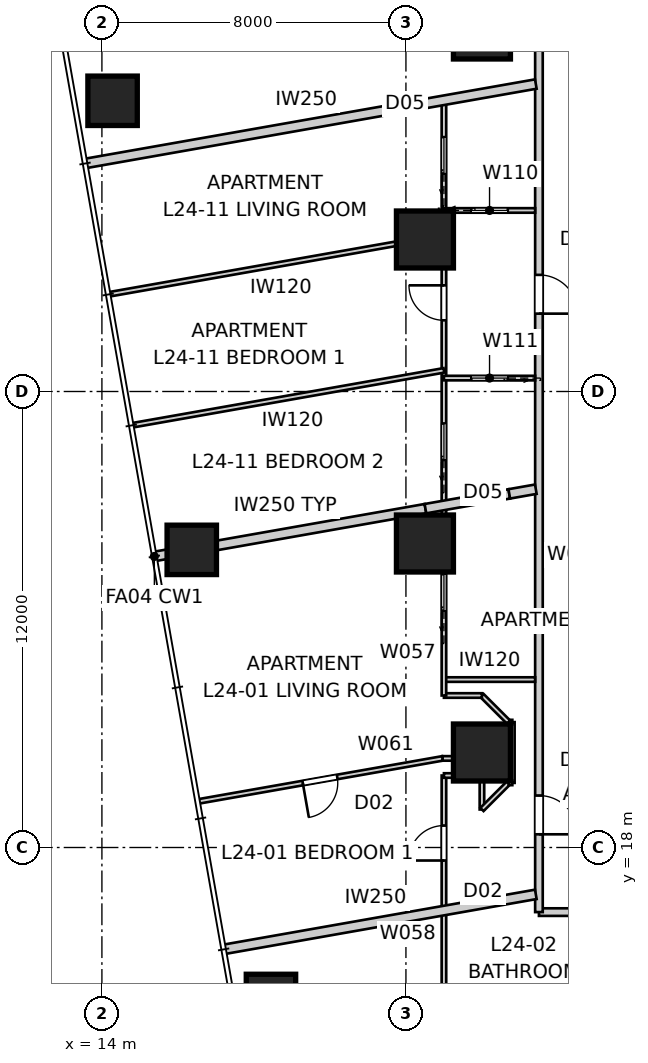
"""IFC4 building model, lengths in metres.
Left out: names, types, materials, properties, quantities, classifications, styles, units other than length and angle.
Written with IfcOpenShell. Run it as: python <this file> out.ifc"""

import sys

from ifc_helpers import new_model, si_unit, direction, frame, frame_2d, origin, origin_2d, place, context, subcontext, project, spatial, rectangle, extrude, element, fill, save


model = new_model("IFC4")
c1 = context("Model", 3, precision=1e-05, world=origin(), true_north=direction((0.0, 1.0)))
c2 = subcontext(c1, "Body", "Model", "MODEL_VIEW")
j1 = project(units=[si_unit("LENGTHUNIT", "METRE"), si_unit("PLANEANGLEUNIT", "RADIAN")], contexts=[c1])
p1 = place(None, origin())
s1 = spatial("IfcSite", under=j1, at=p1, CompositionType="ELEMENT")
p2 = place(p1, origin())
s2 = spatial("IfcBuilding", under=s1, at=p2, CompositionType="ELEMENT")
p3 = place(p2, frame((0.0, 0.0, 89.6)))
s3 = spatial("IfcBuildingStorey", under=s2, at=p3, CompositionType="ELEMENT", Elevation=89.6)
for number, where, z_axis, x_axis in (
    (1, (14.281, 37.65, 0.0), (0.0, 0.0, 1.0), (1.0, 0.0, 0.0)),
    (2, (16.365, 25.833, 0.0), (0.0, 0.0, 1.0), (1.0, 0.0, 0.0)),
    (3, (18.448, 14.015, 0.0), (0.0, 0.0, 1.0), (1.0, 0.0, 0.0)),
):
    element("IfcColumn", number, at=place(p3, frame(where, z_axis=z_axis, x_axis=x_axis)), inside=s3, PredefinedType="COLUMN", context=c2, shape_type="SweptSolid", body=[
        extrude(rectangle(XDim=1.3, YDim=1.3, at=origin_2d()), origin(), (0.0, 0.0, 1.0), 3.4),
    ])
for number, where, z_axis, x_axis in (
    (4, (24.0, 39.5, 0.0), (0.0, 0.0, 1.0), (1.0, 0.0, 0.0)),
    (5, (22.5, 34.0, 0.0), (0.0, 0.0, 1.0), (1.0, 0.0, 0.0)),
    (6, (22.5, 26.0, 0.0), (0.0, 0.0, 1.0), (1.0, 0.0, 0.0)),
    (7, (24.0, 20.5, 0.0), (0.0, 0.0, 1.0), (1.0, 0.0, 0.0)),
):
    element("IfcColumn", number, at=place(p3, frame(where, z_axis=z_axis, x_axis=x_axis)), inside=s3, PredefinedType="COLUMN", context=c2, shape_type="SweptSolid", body=[
        extrude(rectangle(XDim=1.5, YDim=1.5, at=origin_2d()), origin(), (0.0, 0.0, 1.0), 3.4),
    ])
p4 = place(p3, frame((25.5, 16.3, 0.0), z_axis=(0.0, 0.0, 1.0), x_axis=(1.0, 0.0, 0.0)))
e8 = element("IfcWall", 8, at=p4, inside=s3, PredefinedType="PARTITIONING", context=c2, shape_type="SweptSolid", body=[
    extrude(rectangle(XDim=29.0, YDim=0.2, at=frame_2d((14.5, 0.0))), origin(), (0.0, 0.0, 1.0), 3.25),
])
p5 = place(p4, frame((20.896, 0.0, 0.0)))
e9 = element("IfcOpeningElement", 9, at=p5, cuts=e8, PredefinedType="OPENING", context=c2, shape_type="SweptSolid", body=[
    extrude(rectangle(XDim=1.02, YDim=2.34, at=frame_2d((0.51, 1.17))), frame((0.0, 0.11, 0.0), z_axis=(0.0, -1.0, 0.0), x_axis=(1.0, 0.0, 0.0)), (0.0, 0.0, 1.0), 0.22),
])
p6 = place(p4, frame((14.257, 0.0, 0.0)))
e10 = element("IfcOpeningElement", 10, at=p6, cuts=e8, PredefinedType="OPENING", context=c2, shape_type="SweptSolid", body=[
    extrude(rectangle(XDim=1.02, YDim=2.34, at=frame_2d((0.51, 1.17))), frame((0.0, 0.11, 0.0), z_axis=(0.0, -1.0, 0.0), x_axis=(1.0, 0.0, 0.0)), (0.0, 0.0, 1.0), 0.22),
])
p7 = place(p4, frame((3.857, 0.0, 0.0)))
e11 = element("IfcOpeningElement", 11, at=p7, cuts=e8, PredefinedType="OPENING", context=c2, shape_type="SweptSolid", body=[
    extrude(rectangle(XDim=1.02, YDim=2.34, at=frame_2d((0.51, 1.17))), frame((0.0, 0.11, 0.0), z_axis=(0.0, -1.0, 0.0), x_axis=(1.0, 0.0, 0.0)), (0.0, 0.0, 1.0), 0.22),
])
p8 = place(p3, frame((25.5, 43.7, 0.0), z_axis=(0.0, 0.0, 1.0), x_axis=(0.0, -1.0, 0.0)))
e12 = element("IfcWall", 12, at=p8, inside=s3, PredefinedType="PARTITIONING", context=c2, shape_type="SweptSolid", body=[
    extrude(rectangle(XDim=27.4, YDim=0.2, at=frame_2d((13.7, 0.0))), origin(), (0.0, 0.0, 1.0), 3.25),
])
p9 = place(p8, frame((24.333, 0.0, 0.0)))
e13 = element("IfcOpeningElement", 13, at=p9, cuts=e12, PredefinedType="OPENING", context=c2, shape_type="SweptSolid", body=[
    extrude(rectangle(XDim=1.02, YDim=2.1, at=frame_2d((0.51, 1.05))), frame((0.0, 0.11, 0.0), z_axis=(0.0, -1.0, 0.0), x_axis=(1.0, 0.0, 0.0)), (0.0, 0.0, 1.0), 0.22),
])
p10 = place(p8, frame((10.631, 0.0, 0.0)))
e14 = element("IfcOpeningElement", 14, at=p10, cuts=e12, PredefinedType="OPENING", context=c2, shape_type="SweptSolid", body=[
    extrude(rectangle(XDim=1.02, YDim=2.34, at=frame_2d((0.51, 1.17))), frame((0.0, 0.11, 0.0), z_axis=(0.0, -1.0, 0.0), x_axis=(1.0, 0.0, 0.0)), (0.0, 0.0, 1.0), 0.22),
])
p11 = place(p8, frame((0.911, 0.0, 0.0)))
e15 = element("IfcOpeningElement", 15, at=p11, cuts=e12, PredefinedType="OPENING", context=c2, shape_type="SweptSolid", body=[
    extrude(rectangle(XDim=1.02, YDim=2.34, at=frame_2d((0.51, 1.17))), frame((0.0, 0.11, 0.0), z_axis=(0.0, -1.0, 0.0), x_axis=(1.0, 0.0, 0.0)), (0.0, 0.0, 1.0), 0.22),
])
p12 = place(p3, frame((15.38, 25.659, 0.0), z_axis=(0.0, 0.0, 1.0), x_axis=(0.984802553948, 0.173677660443, 0.0)))
e16 = element("IfcWall", 16, at=p12, inside=s3, PredefinedType="PARTITIONING", context=c2, shape_type="SweptSolid", body=[
    extrude(rectangle(XDim=7.244, YDim=0.25, at=frame_2d((3.622, 0.0))), origin(), (0.0, 0.0, 1.0), 3.25),
])
p13 = place(p3, frame((22.513, 26.917, 0.0), z_axis=(0.0, 0.0, 1.0), x_axis=(0.984809882944, 0.17363609779, 0.0)))
e17 = element("IfcWall", 17, at=p13, inside=s3, PredefinedType="PARTITIONING", context=c2, shape_type="SweptSolid", body=[
    extrude(rectangle(XDim=2.24, YDim=0.25, at=frame_2d((1.12, 0.0))), origin(), (0.0, 0.0, 1.0), 2.796),
])
p14 = place(p3, frame((24.719, 27.306, 0.0), z_axis=(0.0, 0.0, 1.0), x_axis=(0.984835495461, 0.173490768861, 0.0)))
e18 = element("IfcWall", 18, at=p14, inside=s3, PredefinedType="PARTITIONING", context=c2, shape_type="SweptSolid", body=[
    extrude(rectangle(XDim=0.709, YDim=0.25, at=frame_2d((0.354, 0.0))), origin(), (0.0, 0.0, 1.0), 3.25),
])
p15 = place(p3, frame((13.556, 35.999, 0.0), z_axis=(0.0, 0.0, 1.0), x_axis=(0.984806609184, 0.173654664517, 0.0)))
e19 = element("IfcWall", 19, at=p15, inside=s3, PredefinedType="PARTITIONING", context=c2, shape_type="SweptSolid", body=[
    extrude(rectangle(XDim=12.044, YDim=0.25, at=frame_2d((6.022, 0.0))), origin(), (0.0, 0.0, 1.0), 3.25),
])
p16 = place(p3, frame((17.203, 15.318, 0.0), z_axis=(0.0, 0.0, 1.0), x_axis=(0.984807121942, 0.173651756605, 0.0)))
e20 = element("IfcWall", 20, at=p16, inside=s3, PredefinedType="PARTITIONING", context=c2, shape_type="SweptSolid", body=[
    extrude(rectangle(XDim=8.341, YDim=0.25, at=frame_2d((4.171, 0.0))), origin(), (0.0, 0.0, 1.0), 3.25),
])
p17 = place(p3, frame((23.0, 22.419, 0.0), z_axis=(0.0, 0.0, 1.0), x_axis=(1.0, 0.0, 0.0)))
e21 = element("IfcWall", 21, at=p17, inside=s3, PredefinedType="PARTITIONING", context=c2, shape_type="SweptSolid", body=[
    extrude(rectangle(XDim=2.4, YDim=0.12, at=frame_2d((1.2, 0.0))), origin(), (0.0, 0.0, 1.0), 3.25),
])
p18 = place(p3, frame((24.0, 20.344, 0.0), z_axis=(0.0, 0.0, 1.0), x_axis=(0.0, -1.0, 0.0)))
e22 = element("IfcWall", 22, at=p18, inside=s3, PredefinedType="PARTITIONING", context=c2, shape_type="SweptSolid", body=[
    extrude(rectangle(XDim=1.344, YDim=0.12, at=frame_2d((0.672, 0.0))), origin(), (0.0, 0.0, 1.0), 3.25),
])
p19 = place(p3, frame((24.0, 19.0, 0.0), z_axis=(0.0, 0.0, 1.0), x_axis=(0.707106781187, 0.707106781187, 0.0)))
e23 = element("IfcWall", 23, at=p19, inside=s3, PredefinedType="PARTITIONING", context=c2, shape_type="SweptSolid", body=[
    extrude(rectangle(XDim=0.99, YDim=0.12, at=frame_2d((0.495, 0.0))), origin(), (0.0, 0.0, 1.0), 3.25),
])
p20 = place(p3, frame((24.8, 19.7, 0.0), z_axis=(0.0, 0.0, 1.0), x_axis=(0.0, 1.0, 0.0)))
e24 = element("IfcWall", 24, at=p20, inside=s3, PredefinedType="PARTITIONING", context=c2, shape_type="SweptSolid", body=[
    extrude(rectangle(XDim=1.6, YDim=0.12, at=frame_2d((0.8, 0.0))), origin(), (0.0, 0.0, 1.0), 3.25),
])
p21 = place(p3, frame((24.7, 21.3, 0.0), z_axis=(0.0, 0.0, 1.0), x_axis=(-0.707106781187, 0.707106781187, 0.0)))
e25 = element("IfcWall", 25, at=p21, inside=s3, PredefinedType="PARTITIONING", context=c2, shape_type="SweptSolid", body=[
    extrude(rectangle(XDim=0.99, YDim=0.12, at=frame_2d((0.495, 0.0))), origin(), (0.0, 0.0, 1.0), 3.25),
])
p22 = place(p3, frame((24.0, 22.0, 0.0), z_axis=(0.0, 0.0, 1.0), x_axis=(-1.0, 0.0, 0.0)))
e26 = element("IfcWall", 26, at=p22, inside=s3, PredefinedType="PARTITIONING", context=c2, shape_type="SweptSolid", body=[
    extrude(rectangle(XDim=1.0, YDim=0.12, at=frame_2d((0.5, 0.0))), origin(), (0.0, 0.0, 1.0), 2.722),
])
p23 = place(p3, frame((23.0, 22.0, 0.0), z_axis=(0.0, 0.0, 1.0), x_axis=(0.0, 1.0, 0.0)))
e27 = element("IfcWall", 27, at=p23, inside=s3, PredefinedType="PARTITIONING", context=c2, shape_type="SweptSolid", body=[
    extrude(rectangle(XDim=15.664, YDim=0.12, at=frame_2d((7.832, 0.0))), origin(), (0.0, 0.0, 1.0), 2.55),
])
p24 = place(p23, frame((9.874, 0.0, 0.0)))
e28 = element("IfcOpeningElement", 28, at=p24, cuts=e27, PredefinedType="OPENING", context=c2, shape_type="SweptSolid", body=[
    extrude(rectangle(XDim=0.92, YDim=2.34, at=frame_2d((0.46, 1.17))), frame((0.0, 0.07, 0.0), z_axis=(0.0, -1.0, 0.0), x_axis=(1.0, 0.0, 0.0)), (0.0, 0.0, 1.0), 0.14),
])
p25 = place(p23, frame((13.734, 0.0, 0.0)))
e29 = element("IfcOpeningElement", 29, at=p25, cuts=e27, PredefinedType="OPENING", context=c2, shape_type="SweptSolid", body=[
    extrude(rectangle(XDim=0.96, YDim=2.1, at=frame_2d((0.48, 1.05))), frame((0.0, 0.07, 0.0), z_axis=(0.0, -1.0, 0.0), x_axis=(1.0, 0.0, 0.0)), (0.0, 0.0, 1.0), 0.14),
])
p26 = place(p23, frame((6.198, 0.0, 0.0)))
e30 = element("IfcOpeningElement", 30, at=p26, cuts=e27, PredefinedType="OPENING", context=c2, shape_type="SweptSolid", body=[
    extrude(rectangle(XDim=0.96, YDim=2.1, at=frame_2d((0.48, 1.05))), frame((0.0, 0.07, 0.0), z_axis=(0.0, -1.0, 0.0), x_axis=(1.0, 0.0, 0.0)), (0.0, 0.0, 1.0), 0.14),
])
p27 = place(p23, frame((2.231, 0.0, 0.0)))
e31 = element("IfcOpeningElement", 31, at=p27, cuts=e27, PredefinedType="OPENING", context=c2, shape_type="SweptSolid", body=[
    extrude(rectangle(XDim=0.96, YDim=2.1, at=frame_2d((0.48, 1.05))), frame((0.0, 0.07, 0.0), z_axis=(0.0, -1.0, 0.0), x_axis=(1.0, 0.0, 0.0)), (0.0, 0.0, 1.0), 0.14),
])
p28 = place(p3, frame((23.0, 13.8, 0.0), z_axis=(0.0, 0.0, 1.0), x_axis=(0.0, 1.0, 0.0)))
e32 = element("IfcWall", 32, at=p28, inside=s3, PredefinedType="PARTITIONING", context=c2, shape_type="SweptSolid", body=[
    extrude(rectangle(XDim=6.094, YDim=0.12, at=frame_2d((3.047, 0.0))), origin(), (0.0, 0.0, 1.0), 3.25),
])
p29 = place(p28, frame((3.857, 0.0, 0.0)))
e33 = element("IfcOpeningElement", 33, at=p29, cuts=e32, PredefinedType="OPENING", context=c2, shape_type="SweptSolid", body=[
    extrude(rectangle(XDim=0.92, YDim=2.34, at=frame_2d((0.46, 1.17))), frame((0.0, 0.07, 0.0), z_axis=(0.0, -1.0, 0.0), x_axis=(1.0, 0.0, 0.0)), (0.0, 0.0, 1.0), 0.14),
])
p30 = place(p3, frame((23.0, 19.894, 0.0), z_axis=(0.0, 0.0, 1.0), x_axis=(1.0, 0.0, 0.0)))
e34 = element("IfcWall", 34, at=p30, inside=s3, PredefinedType="PARTITIONING", context=c2, shape_type="SweptSolid", body=[
    extrude(rectangle(XDim=1.0, YDim=0.12, at=frame_2d((0.5, 0.0))), origin(), (0.0, 0.0, 1.0), 3.25),
])
p31 = place(p3, frame((24.0, 20.344, 0.0), z_axis=(0.0, 0.0, 1.0), x_axis=(-1.0, 0.0, 0.0)))
e35 = element("IfcWall", 35, at=p31, inside=s3, PredefinedType="PARTITIONING", context=c2, shape_type="SweptSolid", body=[
    extrude(rectangle(XDim=1.039, YDim=0.12, at=frame_2d((0.52, 0.0))), origin(), (0.0, 0.0, 1.0), 3.25),
])
p32 = place(p3, frame((22.961, 20.344, 0.0), z_axis=(0.0, 0.0, 1.0), x_axis=(-0.984809249117, -0.173639692622, 0.0)))
e36 = element("IfcWall", 36, at=p32, inside=s3, PredefinedType="PARTITIONING", context=c2, shape_type="SweptSolid", body=[
    extrude(rectangle(XDim=6.503, YDim=0.12, at=frame_2d((3.251, 0.0))), origin(), (0.0, 0.0, 1.0), 3.25),
])
p33 = place(p32, frame((2.811, 0.0, 0.0)))
e37 = element("IfcOpeningElement", 37, at=p33, cuts=e36, PredefinedType="OPENING", context=c2, shape_type="SweptSolid", body=[
    extrude(rectangle(XDim=0.92, YDim=2.34, at=frame_2d((0.46, 1.17))), frame((0.0, 0.07, 0.0), z_axis=(0.0, -1.0, 0.0), x_axis=(1.0, 0.0, 0.0)), (0.0, 0.0, 1.0), 0.14),
])
p34 = place(p3, frame((23.0, 34.764, 0.0), z_axis=(0.0, 0.0, 1.0), x_axis=(1.0, 0.0, 0.0)))
e38 = element("IfcWall", 38, at=p34, inside=s3, PredefinedType="PARTITIONING", context=c2, shape_type="SweptSolid", body=[
    extrude(rectangle(XDim=2.4, YDim=0.12, at=frame_2d((1.2, 0.0))), origin(), (0.0, 0.0, 1.0), 3.25),
])
p35 = place(p34, frame((0.72, 0.0, 0.0)))
e39 = element("IfcOpeningElement", 39, at=p35, cuts=e38, PredefinedType="OPENING", context=c2, shape_type="SweptSolid", body=[
    extrude(rectangle(XDim=0.96, YDim=2.1, at=frame_2d((0.48, 1.05))), frame((0.0, 0.07, 0.0), z_axis=(0.0, -1.0, 0.0), x_axis=(1.0, 0.0, 0.0)), (0.0, 0.0, 1.0), 0.14),
])
p36 = place(p3, frame((25.4, 30.353, 0.0), z_axis=(0.0, 0.0, 1.0), x_axis=(-1.0, 0.0, 0.0)))
e40 = element("IfcWall", 40, at=p36, inside=s3, PredefinedType="PARTITIONING", context=c2, shape_type="SweptSolid", body=[
    extrude(rectangle(XDim=2.4, YDim=0.12, at=frame_2d((1.2, 0.0))), origin(), (0.0, 0.0, 1.0), 3.25),
])
p37 = place(p36, frame((0.72, 0.0, 0.0)))
e41 = element("IfcOpeningElement", 41, at=p37, cuts=e40, PredefinedType="OPENING", context=c2, shape_type="SweptSolid", body=[
    extrude(rectangle(XDim=0.96, YDim=2.1, at=frame_2d((0.48, 1.05))), frame((0.0, 0.07, 0.0), z_axis=(0.0, -1.0, 0.0), x_axis=(1.0, 0.0, 0.0)), (0.0, 0.0, 1.0), 0.14),
])
p38 = place(p3, frame((23.0, 34.11, 0.0), z_axis=(0.0, 0.0, 1.0), x_axis=(-0.984808038675, -0.173646557583, 0.0)))
e42 = element("IfcWall", 42, at=p38, inside=s3, PredefinedType="PARTITIONING", context=c2, shape_type="SweptSolid", body=[
    extrude(rectangle(XDim=8.932, YDim=0.12, at=frame_2d((4.466, 0.0))), origin(), (0.0, 0.0, 1.0), 3.25),
])
p39 = place(p3, frame((23.0, 30.556, 0.0), z_axis=(0.0, 0.0, 1.0), x_axis=(-0.984807787824, -0.173647980238, 0.0)))
e43 = element("IfcWall", 43, at=p39, inside=s3, PredefinedType="PARTITIONING", context=c2, shape_type="SweptSolid", body=[
    extrude(rectangle(XDim=8.315, YDim=0.12, at=frame_2d((4.157, 0.0))), origin(), (0.0, 0.0, 1.0), 3.25),
])
for number, where, z_axis, x_axis in (
    (44, (24.8, 19.7, 0.0), (0.0, 0.0, 1.0), (-1.0, 0.0, 0.0)),
    (45, (24.8, 21.3, 0.0), (0.0, 0.0, 1.0), (-1.0, 0.0, 0.0)),
):
    element("IfcWall", number, at=place(p3, frame(where, z_axis=z_axis, x_axis=x_axis)), inside=s3, PredefinedType="PARTITIONING", context=c2, shape_type="SweptSolid", body=[
        extrude(rectangle(XDim=0.1, YDim=0.12, at=frame_2d((0.05, 0.0))), origin(), (0.0, 0.0, 1.0), 3.25),
    ])
p40 = place(p9, origin())
e46 = element("IfcDoor", 46, at=p40, inside=s3, OperationType="SINGLE_SWING_RIGHT", PredefinedType="DOOR", context=c2, shape_type="SweptSolid", body=[
    extrude(rectangle(XDim=1.02, YDim=2.1, at=frame_2d((0.51, 1.05))), frame((0.0, 0.025, 0.0), z_axis=(0.0, -1.0, 0.0), x_axis=(1.0, 0.0, 0.0)), (0.0, 0.0, 1.0), 0.05),
])
fill(e13, e46)
p41 = place(p10, origin())
e47 = element("IfcDoor", 47, at=p41, inside=s3, OperationType="SINGLE_SWING_RIGHT", PredefinedType="DOOR", context=c2, shape_type="SweptSolid", body=[
    extrude(rectangle(XDim=1.02, YDim=2.34, at=frame_2d((0.51, 1.17))), frame((0.0, 0.025, 0.0), z_axis=(0.0, -1.0, 0.0), x_axis=(1.0, 0.0, 0.0)), (0.0, 0.0, 1.0), 0.05),
])
fill(e14, e47)
p42 = place(p29, origin())
e48 = element("IfcDoor", 48, at=p42, inside=s3, OperationType="SINGLE_SWING_LEFT", PredefinedType="DOOR", context=c2, shape_type="SweptSolid", body=[
    extrude(rectangle(XDim=0.92, YDim=2.34, at=frame_2d((0.46, 1.17))), frame((0.0, 0.025, 0.0), z_axis=(0.0, -1.0, 0.0), x_axis=(1.0, 0.0, 0.0)), (0.0, 0.0, 1.0), 0.05),
])
fill(e33, e48)
p43 = place(p24, origin())
e49 = element("IfcDoor", 49, at=p43, inside=s3, OperationType="SINGLE_SWING_RIGHT", PredefinedType="DOOR", context=c2, shape_type="SweptSolid", body=[
    extrude(rectangle(XDim=0.92, YDim=2.34, at=frame_2d((0.46, 1.17))), frame((0.0, 0.025, 0.0), z_axis=(0.0, -1.0, 0.0), x_axis=(1.0, 0.0, 0.0)), (0.0, 0.0, 1.0), 0.05),
])
fill(e28, e49)
p44 = place(p35, origin())
e50 = element("IfcDoor", 50, at=p44, inside=s3, OperationType="SLIDING_TO_LEFT", PredefinedType="DOOR", context=c2, shape_type="SweptSolid", body=[
    extrude(rectangle(XDim=0.96, YDim=2.1, at=frame_2d((0.48, 1.05))), frame((0.0, 0.025, 0.0), z_axis=(0.0, -1.0, 0.0), x_axis=(1.0, 0.0, 0.0)), (0.0, 0.0, 1.0), 0.05),
])
fill(e39, e50)
p45 = place(p37, origin())
e51 = element("IfcDoor", 51, at=p45, inside=s3, OperationType="SLIDING_TO_LEFT", PredefinedType="DOOR", context=c2, shape_type="SweptSolid", body=[
    extrude(rectangle(XDim=0.96, YDim=2.1, at=frame_2d((0.48, 1.05))), frame((0.0, 0.025, 0.0), z_axis=(0.0, -1.0, 0.0), x_axis=(1.0, 0.0, 0.0)), (0.0, 0.0, 1.0), 0.05),
])
fill(e41, e51)
p46 = place(p25, origin())
e52 = element("IfcDoor", 52, at=p46, inside=s3, OperationType="SLIDING_TO_LEFT", PredefinedType="DOOR", context=c2, shape_type="SweptSolid", body=[
    extrude(rectangle(XDim=0.96, YDim=2.1, at=frame_2d((0.48, 1.05))), frame((0.0, 0.025, 0.0), z_axis=(0.0, -1.0, 0.0), x_axis=(1.0, 0.0, 0.0)), (0.0, 0.0, 1.0), 0.05),
])
fill(e29, e52)
p47 = place(p26, origin())
e53 = element("IfcDoor", 53, at=p47, inside=s3, OperationType="SLIDING_TO_LEFT", PredefinedType="DOOR", context=c2, shape_type="SweptSolid", body=[
    extrude(rectangle(XDim=0.96, YDim=2.1, at=frame_2d((0.48, 1.05))), frame((0.0, 0.025, 0.0), z_axis=(0.0, -1.0, 0.0), x_axis=(1.0, 0.0, 0.0)), (0.0, 0.0, 1.0), 0.05),
])
fill(e30, e53)
p48 = place(p33, origin())
e54 = element("IfcDoor", 54, at=p48, inside=s3, OperationType="SINGLE_SWING_RIGHT", PredefinedType="DOOR", context=c2, shape_type="SweptSolid", body=[
    extrude(rectangle(XDim=0.92, YDim=2.34, at=frame_2d((0.46, 1.17))), frame((0.0, 0.025, 0.0), z_axis=(0.0, -1.0, 0.0), x_axis=(1.0, 0.0, 0.0)), (0.0, 0.0, 1.0), 0.05),
])
fill(e37, e54)
p49 = place(p27, origin())
e55 = element("IfcDoor", 55, at=p49, inside=s3, OperationType="SLIDING_TO_LEFT", PredefinedType="DOOR", context=c2, shape_type="SweptSolid", body=[
    extrude(rectangle(XDim=0.96, YDim=2.1, at=frame_2d((0.48, 1.05))), frame((0.0, 0.025, 0.0), z_axis=(0.0, -1.0, 0.0), x_axis=(1.0, 0.0, 0.0)), (0.0, 0.0, 1.0), 0.05),
])
fill(e31, e55)
save(model, sys.argv[1])
